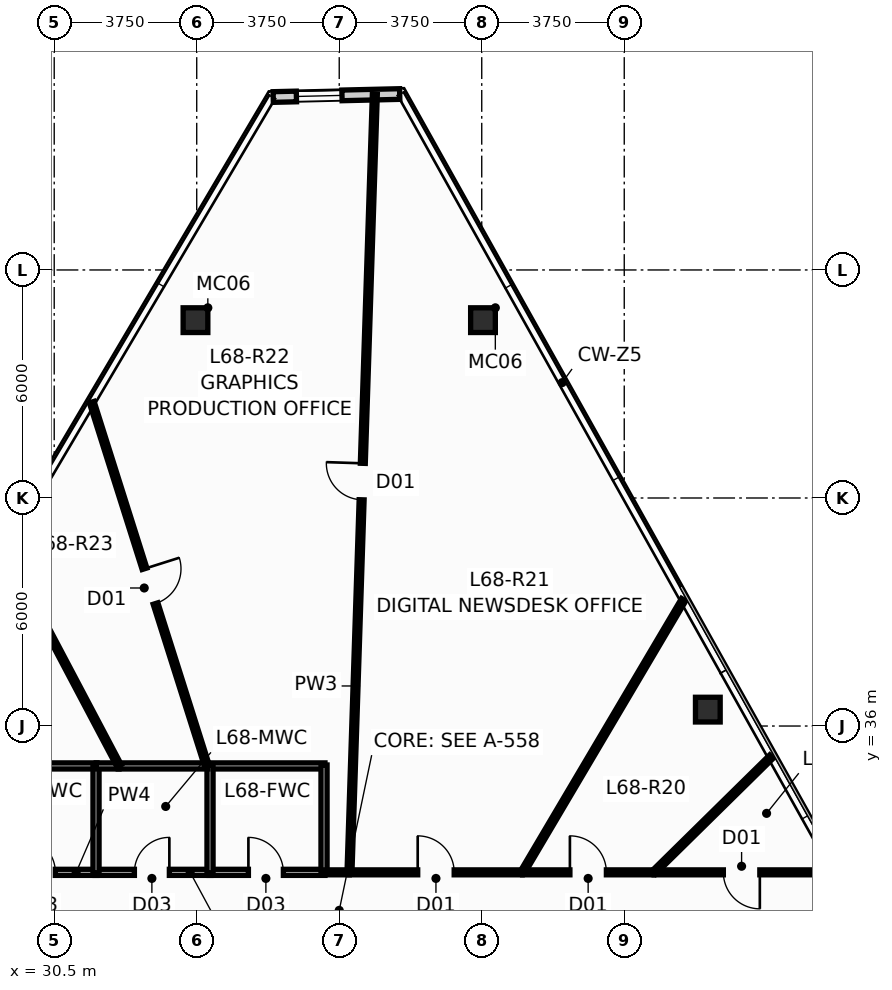
"""IFC4 building model, lengths in metres.
Left out: names, types, materials, properties, quantities, classifications, styles, units other than length and angle.
Written with IfcOpenShell. Run it as: python <this file> out.ifc"""

import sys

from ifc_helpers import new_model, si_unit, direction, frame, frame_2d, origin, origin_2d, place, context, subcontext, project, spatial, rectangle, hollow_rectangle, extrude, source, transform, mapped, element, fill, save


model = new_model("IFC4")
c1 = context("Model", 3, precision=1e-05, world=origin(), true_north=direction((0.0, 1.0)))
c2 = subcontext(c1, "Body", "Model", "MODEL_VIEW")
j1 = project(units=[si_unit("LENGTHUNIT", "METRE"), si_unit("PLANEANGLEUNIT", "RADIAN")], contexts=[c1])
p1 = place(None, origin())
s1 = spatial("IfcSite", under=j1, at=p1, CompositionType="ELEMENT")
p2 = place(p1, origin())
s2 = spatial("IfcBuilding", under=s1, at=p2, CompositionType="ELEMENT")
p3 = place(p2, frame((0.0, 0.0, 259.05)))
s3 = spatial("IfcBuildingStorey", under=s2, at=p3, CompositionType="ELEMENT", Elevation=259.05)
m1 = source(origin(), c2, "Body", "SweptSolid", [
    extrude(hollow_rectangle(XDim=0.65, YDim=0.65, WallThickness=0.04, at=origin_2d()), origin(), (0.0, 0.0, 1.0), 3.651),
])
for number, where, z_axis, x_axis in (
    (1, (41.783, 46.679, 0.0), (-0.024, 0.002, 1.0), (-0.075, -0.997, 0.0)),
    (2, (34.217, 46.679, 0.0), (0.024, 0.002, 1.0), (-0.075, 0.997, 0.0)),
):
    element("IfcColumn", number, at=place(p3, frame(where, z_axis=z_axis, x_axis=x_axis)), inside=s3, PredefinedType="COLUMN", context=c2, shape_type="MappedRepresentation", body=[
        mapped(m1, transform((0.0, 0.0, 0.0), scale=1.0)),
    ])
m2 = source(origin(), c2, "Body", "SweptSolid", [
    extrude(hollow_rectangle(XDim=0.65, YDim=0.65, WallThickness=0.04, at=origin_2d()), origin(), (0.0, 0.0, 1.0), 3.651),
])
p4 = place(p3, frame((47.699, 36.432, 0.0), z_axis=(-0.019393993486, -0.006018825565, 0.999793802119), x_axis=(0.296399214872, -0.955064136811, 0.0)))
e3 = element("IfcColumn", 3, at=p4, inside=s3, PredefinedType="COLUMN", context=c2, shape_type="MappedRepresentation", body=[
    mapped(m2, transform((0.0, 0.0, 0.0), scale=1.0)),
])
p5 = place(p3, frame((36.263, 52.551, 0.0), z_axis=(0.0, 0.0, 1.0), x_axis=(0.999721143415, 0.023614305177, 0.0)))
e4 = element("IfcWall", 4, at=p5, inside=s3, PredefinedType="STANDARD", context=c2, shape_type="SweptSolid", body=[
    extrude(rectangle(XDim=3.329, YDim=0.28, at=frame_2d((1.665, 0.0))), origin(), (0.0, 0.0, 1.0), 3.4),
])
p6 = place(p5, frame((0.61, 0.0, 0.9)))
e5 = element("IfcOpeningElement", 5, at=p6, cuts=e4, PredefinedType="OPENING", context=c2, shape_type="SweptSolid", body=[
    extrude(rectangle(XDim=1.2, YDim=1.65, at=frame_2d((0.6, 0.825))), frame((0.0, 0.152, 0.0), z_axis=(0.0, -1.0, 0.0), x_axis=(1.0, 0.0, 0.0)), (0.0, 0.0, 1.0), 0.304),
])
p7 = place(p3, frame((28.575, 32.15, 0.0), z_axis=(0.0, 0.0, 1.0), x_axis=(1.0, 0.0, 0.0)))
e6 = element("IfcWall", 6, at=p7, inside=s3, PredefinedType="PLUMBINGWALL", context=c2, shape_type="SweptSolid", body=[
    extrude(rectangle(XDim=3.05, YDim=0.16, at=frame_2d((1.525, 0.0))), origin(), (0.0, 0.0, 1.0), 3.4),
])
p8 = place(p7, frame((1.035, 0.0, 0.0)))
e7 = element("IfcOpeningElement", 7, at=p8, cuts=e6, PredefinedType="OPENING", context=c2, shape_type="SweptSolid", body=[
    extrude(rectangle(XDim=0.92, YDim=2.1, at=frame_2d((0.46, 1.05))), frame((0.0, 0.092, 0.0), z_axis=(0.0, -1.0, 0.0), x_axis=(1.0, 0.0, 0.0)), (0.0, 0.0, 1.0), 0.184),
])
p9 = place(p3, frame((31.575, 32.15, 0.0), z_axis=(0.0, 0.0, 1.0), x_axis=(1.0, 0.0, 0.0)))
e8 = element("IfcWall", 8, at=p9, inside=s3, PredefinedType="PLUMBINGWALL", context=c2, shape_type="SweptSolid", body=[
    extrude(rectangle(XDim=3.05, YDim=0.16, at=frame_2d((1.525, 0.0))), origin(), (0.0, 0.0, 1.0), 3.4),
])
p10 = place(p9, frame((1.035, 0.0, 0.0)))
e9 = element("IfcOpeningElement", 9, at=p10, cuts=e8, PredefinedType="OPENING", context=c2, shape_type="SweptSolid", body=[
    extrude(rectangle(XDim=0.92, YDim=2.1, at=frame_2d((0.46, 1.05))), frame((0.0, 0.092, 0.0), z_axis=(0.0, -1.0, 0.0), x_axis=(1.0, 0.0, 0.0)), (0.0, 0.0, 1.0), 0.184),
])
p11 = place(p3, frame((34.575, 32.15, 0.0), z_axis=(0.0, 0.0, 1.0), x_axis=(1.0, 0.0, 0.0)))
e10 = element("IfcWall", 10, at=p11, inside=s3, PredefinedType="PLUMBINGWALL", context=c2, shape_type="SweptSolid", body=[
    extrude(rectangle(XDim=3.05, YDim=0.16, at=frame_2d((1.525, 0.0))), origin(), (0.0, 0.0, 1.0), 3.4),
])
p12 = place(p11, frame((1.035, 0.0, 0.0)))
e11 = element("IfcOpeningElement", 11, at=p12, cuts=e10, PredefinedType="OPENING", context=c2, shape_type="SweptSolid", body=[
    extrude(rectangle(XDim=0.92, YDim=2.1, at=frame_2d((0.46, 1.05))), frame((0.0, 0.092, 0.0), z_axis=(0.0, -1.0, 0.0), x_axis=(1.0, 0.0, 0.0)), (0.0, 0.0, 1.0), 0.184),
])
for number, where, z_axis, x_axis in (
    (12, (28.575, 34.95, 0.0), (0.0, 0.0, 1.0), (1.0, 0.0, 0.0)),
    (13, (37.625, 34.95, 0.0), (0.0, 0.0, 1.0), (-1.0, 0.0, 0.0)),
):
    element("IfcWall", number, at=place(p3, frame(where, z_axis=z_axis, x_axis=x_axis)), inside=s3, PredefinedType="PLUMBINGWALL", context=c2, shape_type="SweptSolid", body=[
        extrude(rectangle(XDim=3.05, YDim=0.16, at=frame_2d((1.525, 0.0))), origin(), (0.0, 0.0, 1.0), 3.4),
    ])
p13 = place(p3, frame((31.6, 32.125, 0.0), z_axis=(0.0, 0.0, 1.0), x_axis=(0.0, 1.0, 0.0)))
e14 = element("IfcWall", 14, at=p13, inside=s3, PredefinedType="PLUMBINGWALL", context=c2, shape_type="SweptSolid", body=[
    extrude(rectangle(XDim=2.85, YDim=0.16, at=frame_2d((1.425, 0.0))), origin(), (0.0, 0.0, 1.0), 2.985),
])
for number, where, z_axis, x_axis in (
    (15, (34.6, 32.125, 0.0), (0.0, 0.0, 1.0), (0.0, 1.0, 0.0)),
    (16, (37.6, 32.125, 0.0), (0.0, 0.0, 1.0), (0.0, 1.0, 0.0)),
):
    element("IfcWall", number, at=place(p3, frame(where, z_axis=z_axis, x_axis=x_axis)), inside=s3, PredefinedType="PLUMBINGWALL", context=c2, shape_type="SweptSolid", body=[
        extrude(rectangle(XDim=2.85, YDim=0.16, at=frame_2d((1.425, 0.0))), origin(), (0.0, 0.0, 1.0), 3.4),
    ])
p14 = place(p3, frame((32.185, 34.95, 0.0), z_axis=(0.0, 0.0, 1.0), x_axis=(1.0, 0.0, 0.0)))
e17 = element("IfcWall", 17, at=p14, inside=s3, PredefinedType="PLUMBINGWALL", context=c2, shape_type="SweptSolid", body=[
    extrude(rectangle(XDim=2.36, YDim=0.16, at=frame_2d((1.18, 0.0))), origin(), (0.0, 0.0, 1.0), 3.4),
])
p15 = place(p3, frame((31.605, 34.95, 0.0), z_axis=(0.0, 0.0, 1.0), x_axis=(1.0, 0.0, 0.0)))
e18 = element("IfcWall", 18, at=p15, inside=s3, PredefinedType="PLUMBINGWALL", context=c2, shape_type="SweptSolid", body=[
    extrude(rectangle(XDim=0.6, YDim=0.16, at=frame_2d((0.3, 0.0))), origin(), (0.0, 0.0, 1.0), 3.4),
])
p16 = place(p3, frame((38.27, 32.155, 0.0), z_axis=(0.0, 0.0, 1.0), x_axis=(0.032576353976, 0.999469249733, 0.0)))
e19 = element("IfcWall", 19, at=p16, inside=s3, PredefinedType="PARTITIONING", context=c2, shape_type="SweptSolid", body=[
    extrude(rectangle(XDim=20.475, YDim=0.13, at=frame_2d((10.237, 0.0))), origin(), (0.0, 0.0, 1.0), 3.4),
])
p17 = place(p16, frame((9.803, 0.0, 0.0)))
e20 = element("IfcOpeningElement", 20, at=p17, cuts=e19, PredefinedType="OPENING", context=c2, shape_type="SweptSolid", body=[
    extrude(rectangle(XDim=0.96, YDim=2.15, at=frame_2d((0.48, 1.075))), frame((0.0, 0.077, 0.0), z_axis=(0.0, -1.0, 0.0), x_axis=(1.0, 0.0, 0.0)), (0.0, 0.0, 1.0), 0.154),
])
p18 = place(p3, frame((31.487, 44.523, 0.0), z_axis=(0.0, 0.0, 1.0), x_axis=(0.30199155665, -0.953310599811, 0.0)))
e21 = element("IfcWall", 21, at=p18, inside=s3, PredefinedType="PARTITIONING", context=c2, shape_type="SweptSolid", body=[
    extrude(rectangle(XDim=10.037, YDim=0.13, at=frame_2d((5.018, 0.0))), origin(), (0.0, 0.0, 1.0), 3.4),
])
p19 = place(p18, frame((4.6, 0.0, 0.0)))
e22 = element("IfcOpeningElement", 22, at=p19, cuts=e21, PredefinedType="OPENING", context=c2, shape_type="SweptSolid", body=[
    extrude(rectangle(XDim=0.96, YDim=2.15, at=frame_2d((0.48, 1.075))), frame((0.0, 0.077, 0.0), z_axis=(0.0, -1.0, 0.0), x_axis=(1.0, 0.0, 0.0)), (0.0, 0.0, 1.0), 0.154),
])
p20 = place(p3, frame((42.823, 32.154, 0.0), z_axis=(0.0, 0.0, 1.0), x_axis=(0.509033391068, 0.860746772737, 0.0)))
e23 = element("IfcWall", 23, at=p20, inside=s3, PredefinedType="PARTITIONING", context=c2, shape_type="SweptSolid", body=[
    extrude(rectangle(XDim=8.331, YDim=0.13, at=frame_2d((4.165, 0.0))), origin(), (0.0, 0.0, 1.0), 3.4),
])
p21 = place(p3, frame((29.199, 40.648, 0.0), z_axis=(0.0, 0.0, 1.0), x_axis=(0.467267535374, -0.884115971118, 0.0)))
e24 = element("IfcWall", 24, at=p21, inside=s3, PredefinedType="PARTITIONING", context=c2, shape_type="SweptSolid", body=[
    extrude(rectangle(XDim=6.44, YDim=0.13, at=frame_2d((3.22, 0.0))), origin(), (0.0, 0.0, 1.0), 3.4),
])
p22 = place(p3, frame((38.275, 32.15, 0.0), z_axis=(0.0, 0.0, 1.0), x_axis=(1.0, 0.0, 0.0)))
e25 = element("IfcWall", 25, at=p22, inside=s3, PredefinedType="PARTITIONING", context=c2, shape_type="SweptSolid", body=[
    extrude(rectangle(XDim=4.54, YDim=0.13, at=frame_2d((2.27, 0.0))), origin(), (0.0, 0.0, 1.0), 3.4),
])
p23 = place(p22, frame((1.79, 0.0, 0.0)))
e26 = element("IfcOpeningElement", 26, at=p23, cuts=e25, PredefinedType="OPENING", context=c2, shape_type="SweptSolid", body=[
    extrude(rectangle(XDim=0.96, YDim=2.15, at=frame_2d((0.48, 1.075))), frame((0.0, 0.077, 0.0), z_axis=(0.0, -1.0, 0.0), x_axis=(1.0, 0.0, 0.0)), (0.0, 0.0, 1.0), 0.154),
])
p24 = place(p3, frame((46.284, 32.154, 0.0), z_axis=(0.0, 0.0, 1.0), x_axis=(0.712718472903, 0.701450196652, 0.0)))
e27 = element("IfcWall", 27, at=p24, inside=s3, PredefinedType="PARTITIONING", context=c2, shape_type="SweptSolid", body=[
    extrude(rectangle(XDim=4.333, YDim=0.13, at=frame_2d((2.167, 0.0))), origin(), (0.0, 0.0, 1.0), 3.4),
])
p25 = place(p3, frame((51.048, 32.15, 0.0), z_axis=(0.0, 0.0, 1.0), x_axis=(-1.0, 0.0, 0.0)))
e28 = element("IfcWall", 28, at=p25, inside=s3, PredefinedType="PARTITIONING", context=c2, shape_type="SweptSolid", body=[
    extrude(rectangle(XDim=4.763, YDim=0.13, at=frame_2d((2.381, 0.0))), origin(), (0.0, 0.0, 1.0), 3.4),
])
p26 = place(p25, frame((1.98, 0.0, 0.0)))
e29 = element("IfcOpeningElement", 29, at=p26, cuts=e28, PredefinedType="OPENING", context=c2, shape_type="SweptSolid", body=[
    extrude(rectangle(XDim=0.96, YDim=2.15, at=frame_2d((0.48, 1.075))), frame((0.0, 0.077, 0.0), z_axis=(0.0, -1.0, 0.0), x_axis=(1.0, 0.0, 0.0)), (0.0, 0.0, 1.0), 0.154),
])
p27 = place(p3, frame((42.825, 32.15, 0.0), z_axis=(0.0, 0.0, 1.0), x_axis=(1.0, 0.0, 0.0)))
e30 = element("IfcWall", 30, at=p27, inside=s3, PredefinedType="PARTITIONING", context=c2, shape_type="SweptSolid", body=[
    extrude(rectangle(XDim=3.45, YDim=0.13, at=frame_2d((1.725, 0.0))), origin(), (0.0, 0.0, 1.0), 3.4),
])
p28 = place(p27, frame((1.245, 0.0, 0.0)))
e31 = element("IfcOpeningElement", 31, at=p28, cuts=e30, PredefinedType="OPENING", context=c2, shape_type="SweptSolid", body=[
    extrude(rectangle(XDim=0.96, YDim=2.15, at=frame_2d((0.48, 1.075))), frame((0.0, 0.077, 0.0), z_axis=(0.0, -1.0, 0.0), x_axis=(1.0, 0.0, 0.0)), (0.0, 0.0, 1.0), 0.154),
])
p29 = place(p3, frame((37.605, 32.15, 0.0), z_axis=(0.0, 0.0, 1.0), x_axis=(1.0, 0.0, 0.0)))
e32 = element("IfcWall", 32, at=p29, inside=s3, PredefinedType="PARTITIONING", context=c2, shape_type="SweptSolid", body=[
    extrude(rectangle(XDim=0.66, YDim=0.13, at=frame_2d((0.33, 0.0))), origin(), (0.0, 0.0, 1.0), 3.4),
])
p30 = place(p6, origin())
e33 = element("IfcWindow", 33, at=p30, inside=s3, PartitioningType="SINGLE_PANEL", PredefinedType="WINDOW", context=c2, shape_type="SweptSolid", body=[
    extrude(rectangle(XDim=1.2, YDim=1.65, at=frame_2d((0.6, 0.825))), frame((0.0, 0.03, 0.0), z_axis=(0.0, -1.0, 0.0), x_axis=(1.0, 0.0, 0.0)), (0.0, 0.0, 1.0), 0.06),
])
fill(e5, e33)
p31 = place(p8, origin())
e34 = element("IfcDoor", 34, at=p31, inside=s3, OperationType="SINGLE_SWING_LEFT", PredefinedType="DOOR", context=c2, shape_type="SweptSolid", body=[
    extrude(rectangle(XDim=0.92, YDim=2.1, at=frame_2d((0.46, 1.05))), frame((0.0, 0.025, 0.0), z_axis=(0.0, -1.0, 0.0), x_axis=(1.0, 0.0, 0.0)), (0.0, 0.0, 1.0), 0.05),
])
fill(e7, e34)
p32 = place(p10, origin())
e35 = element("IfcDoor", 35, at=p32, inside=s3, OperationType="SINGLE_SWING_RIGHT", PredefinedType="DOOR", context=c2, shape_type="SweptSolid", body=[
    extrude(rectangle(XDim=0.92, YDim=2.1, at=frame_2d((0.46, 1.05))), frame((0.0, 0.025, 0.0), z_axis=(0.0, -1.0, 0.0), x_axis=(1.0, 0.0, 0.0)), (0.0, 0.0, 1.0), 0.05),
])
fill(e9, e35)
p33 = place(p12, origin())
e36 = element("IfcDoor", 36, at=p33, inside=s3, OperationType="SINGLE_SWING_LEFT", PredefinedType="DOOR", context=c2, shape_type="SweptSolid", body=[
    extrude(rectangle(XDim=0.92, YDim=2.1, at=frame_2d((0.46, 1.05))), frame((0.0, 0.025, 0.0), z_axis=(0.0, -1.0, 0.0), x_axis=(1.0, 0.0, 0.0)), (0.0, 0.0, 1.0), 0.05),
])
fill(e11, e36)
p34 = place(p17, origin())
e37 = element("IfcDoor", 37, at=p34, inside=s3, OperationType="SINGLE_SWING_RIGHT", PredefinedType="DOOR", context=c2, shape_type="SweptSolid", body=[
    extrude(rectangle(XDim=0.96, YDim=2.15, at=frame_2d((0.48, 1.075))), frame((0.0, 0.025, 0.0), z_axis=(0.0, -1.0, 0.0), x_axis=(1.0, 0.0, 0.0)), (0.0, 0.0, 1.0), 0.05),
])
fill(e20, e37)
p35 = place(p19, origin())
e38 = element("IfcDoor", 38, at=p35, inside=s3, OperationType="SINGLE_SWING_LEFT", PredefinedType="DOOR", context=c2, shape_type="SweptSolid", body=[
    extrude(rectangle(XDim=0.96, YDim=2.15, at=frame_2d((0.48, 1.075))), frame((0.0, 0.025, 0.0), z_axis=(0.0, -1.0, 0.0), x_axis=(1.0, 0.0, 0.0)), (0.0, 0.0, 1.0), 0.05),
])
fill(e22, e38)
p36 = place(p23, origin())
e39 = element("IfcDoor", 39, at=p36, inside=s3, OperationType="SINGLE_SWING_LEFT", PredefinedType="DOOR", context=c2, shape_type="SweptSolid", body=[
    extrude(rectangle(XDim=0.96, YDim=2.15, at=frame_2d((0.48, 1.075))), frame((0.0, 0.025, 0.0), z_axis=(0.0, -1.0, 0.0), x_axis=(1.0, 0.0, 0.0)), (0.0, 0.0, 1.0), 0.05),
])
fill(e26, e39)
p37 = place(p26, origin())
e40 = element("IfcDoor", 40, at=p37, inside=s3, OperationType="SINGLE_SWING_LEFT", PredefinedType="DOOR", context=c2, shape_type="SweptSolid", body=[
    extrude(rectangle(XDim=0.96, YDim=2.15, at=frame_2d((0.48, 1.075))), frame((0.0, 0.025, 0.0), z_axis=(0.0, -1.0, 0.0), x_axis=(1.0, 0.0, 0.0)), (0.0, 0.0, 1.0), 0.05),
])
fill(e29, e40)
p38 = place(p28, origin())
e41 = element("IfcDoor", 41, at=p38, inside=s3, OperationType="SINGLE_SWING_LEFT", PredefinedType="DOOR", context=c2, shape_type="SweptSolid", body=[
    extrude(rectangle(XDim=0.96, YDim=2.15, at=frame_2d((0.48, 1.075))), frame((0.0, 0.025, 0.0), z_axis=(0.0, -1.0, 0.0), x_axis=(1.0, 0.0, 0.0)), (0.0, 0.0, 1.0), 0.05),
])
fill(e31, e41)
save(model, sys.argv[1])
